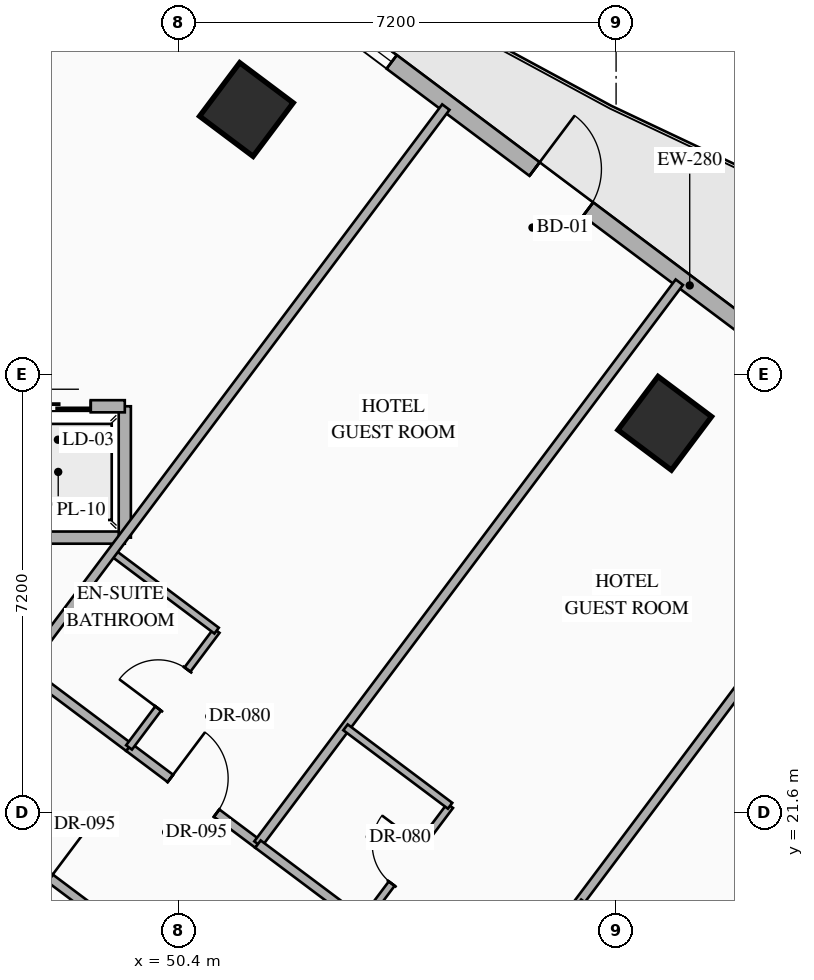
"""IFC4 building model, lengths in metres.
Left out: names, types, materials, properties, quantities, classifications, styles, units other than length and angle.
Written with IfcOpenShell. Run it as: python <this file> out.ifc"""

import sys

from ifc_helpers import new_model, si_unit, direction, frame, frame_2d, origin, origin_2d, place, context, subcontext, project, spatial, rectangle, hollow_rectangle, extrude, element, fill, save


model = new_model("IFC4")
c1 = context("Model", 3, precision=1e-05, world=origin(), true_north=direction((0.0, 1.0)))
c2 = subcontext(c1, "Body", "Model", "MODEL_VIEW")
j1 = project(units=[si_unit("LENGTHUNIT", "METRE"), si_unit("PLANEANGLEUNIT", "RADIAN")], contexts=[c1])
p1 = place(None, origin())
s1 = spatial("IfcSite", under=j1, at=p1, CompositionType="ELEMENT")
p2 = place(p1, origin())
s2 = spatial("IfcBuilding", under=s1, at=p2, CompositionType="ELEMENT")
p3 = place(p2, frame((0.0, 0.0, 50.0)))
s3 = spatial("IfcBuildingStorey", under=s2, at=p3, CompositionType="ELEMENT", Elevation=50.0)
for number, where, z_axis, x_axis in (
    (1, (51.52, 33.16, 0.0), (0.0, 0.0, 1.0), (0.8, -0.6, 0.0)),
    (2, (58.4, 28.0, 0.0), (0.0, 0.0, 1.0), (0.8, -0.6, 0.0)),
):
    element("IfcColumn", number, at=place(p3, frame(where, z_axis=z_axis, x_axis=x_axis)), inside=s3, PredefinedType="COLUMN", context=c2, shape_type="SweptSolid", body=[
        extrude(hollow_rectangle(XDim=1.1, YDim=1.1, WallThickness=0.04, at=origin_2d()), origin(), (0.0, 0.0, 1.0), 3.35),
    ])
p4 = place(p3, frame((44.86, 40.73, 0.0), z_axis=(0.0, 0.0, 1.0), x_axis=(0.800006902154, -0.599990797017, 0.0)))
e3 = element("IfcWall", 3, at=p4, inside=s3, PredefinedType="STANDARD", context=c2, shape_type="SweptSolid", body=[
    extrude(rectangle(XDim=29.712, YDim=0.28, at=frame_2d((14.856, 0.0))), origin(), (0.0, 0.0, 1.0), 3.13),
])
p5 = place(p4, frame((14.249, 0.0, 0.0)))
e4 = element("IfcOpeningElement", 4, at=p5, cuts=e3, PredefinedType="OPENING", context=c2, shape_type="SweptSolid", body=[
    extrude(rectangle(XDim=1.1, YDim=2.2, at=frame_2d((0.55, 1.1))), frame((0.0, 0.15, 0.0), z_axis=(0.0, -1.0, 0.0), x_axis=(1.0, 0.0, 0.0)), (0.0, 0.0, 1.0), 0.3),
])
p6 = place(p4, frame((1.612, 0.0, 0.85)))
e5 = element("IfcOpeningElement", 5, at=p6, cuts=e3, PredefinedType="OPENING", context=c2, shape_type="SweptSolid", body=[
    extrude(rectangle(XDim=1.4, YDim=1.8, at=frame_2d((0.7, 0.9))), frame((0.0, 0.15, 0.0), z_axis=(0.0, -1.0, 0.0), x_axis=(1.0, 0.0, 0.0)), (0.0, 0.0, 1.0), 0.3),
])
p7 = place(p4, frame((5.667, 0.0, 0.85)))
e6 = element("IfcOpeningElement", 6, at=p7, cuts=e3, PredefinedType="OPENING", context=c2, shape_type="SweptSolid", body=[
    extrude(rectangle(XDim=1.4, YDim=1.8, at=frame_2d((0.7, 0.9))), frame((0.0, 0.15, 0.0), z_axis=(0.0, -1.0, 0.0), x_axis=(1.0, 0.0, 0.0)), (0.0, 0.0, 1.0), 0.3),
])
p8 = place(p4, frame((9.912, 0.0, 0.85)))
e7 = element("IfcOpeningElement", 7, at=p8, cuts=e3, PredefinedType="OPENING", context=c2, shape_type="SweptSolid", body=[
    extrude(rectangle(XDim=1.4, YDim=1.8, at=frame_2d((0.7, 0.9))), frame((0.0, 0.15, 0.0), z_axis=(0.0, -1.0, 0.0), x_axis=(1.0, 0.0, 0.0)), (0.0, 0.0, 1.0), 0.3),
])
p9 = place(p4, frame((19.528, 0.0, 0.85)))
e8 = element("IfcOpeningElement", 8, at=p9, cuts=e3, PredefinedType="OPENING", context=c2, shape_type="SweptSolid", body=[
    extrude(rectangle(XDim=1.4, YDim=1.8, at=frame_2d((0.7, 0.9))), frame((0.0, 0.15, 0.0), z_axis=(0.0, -1.0, 0.0), x_axis=(1.0, 0.0, 0.0)), (0.0, 0.0, 1.0), 0.3),
])
p10 = place(p4, frame((23.451, 0.0, 0.85)))
e9 = element("IfcOpeningElement", 9, at=p10, cuts=e3, PredefinedType="OPENING", context=c2, shape_type="SweptSolid", body=[
    extrude(rectangle(XDim=1.4, YDim=1.8, at=frame_2d((0.7, 0.9))), frame((0.0, 0.15, 0.0), z_axis=(0.0, -1.0, 0.0), x_axis=(1.0, 0.0, 0.0)), (0.0, 0.0, 1.0), 0.3),
])
p11 = place(p4, frame((27.852, 0.0, 0.85)))
e10 = element("IfcOpeningElement", 10, at=p11, cuts=e3, PredefinedType="OPENING", context=c2, shape_type="SweptSolid", body=[
    extrude(rectangle(XDim=1.4, YDim=1.8, at=frame_2d((0.7, 0.9))), frame((0.0, 0.15, 0.0), z_axis=(0.0, -1.0, 0.0), x_axis=(1.0, 0.0, 0.0)), (0.0, 0.0, 1.0), 0.3),
])
p12 = place(p3, frame((53.318, 2.487, 0.0), z_axis=(0.0, 0.0, 1.0), x_axis=(-0.800004174678, 0.599994433723, 0.0)))
e11 = element("IfcWall", 11, at=p12, inside=s3, PredefinedType="STANDARD", context=c2, shape_type="SweptSolid", body=[
    extrude(rectangle(XDim=35.089, YDim=0.28, at=frame_2d((17.544, 0.0))), origin(), (0.0, 0.0, 1.0), 3.13),
])
p13 = place(p12, frame((1.931, 0.0, 0.85)))
e12 = element("IfcOpeningElement", 12, at=p13, cuts=e11, PredefinedType="OPENING", context=c2, shape_type="SweptSolid", body=[
    extrude(rectangle(XDim=1.4, YDim=1.8, at=frame_2d((0.7, 0.9))), frame((0.0, 0.15, 0.0), z_axis=(0.0, -1.0, 0.0), x_axis=(1.0, 0.0, 0.0)), (0.0, 0.0, 1.0), 0.3),
])
p14 = place(p12, frame((6.819, 0.0, 0.85)))
e13 = element("IfcOpeningElement", 13, at=p14, cuts=e11, PredefinedType="OPENING", context=c2, shape_type="SweptSolid", body=[
    extrude(rectangle(XDim=1.4, YDim=1.8, at=frame_2d((0.7, 0.9))), frame((0.0, 0.15, 0.0), z_axis=(0.0, -1.0, 0.0), x_axis=(1.0, 0.0, 0.0)), (0.0, 0.0, 1.0), 0.3),
])
p15 = place(p12, frame((11.832, 0.0, 0.85)))
e14 = element("IfcOpeningElement", 14, at=p15, cuts=e11, PredefinedType="OPENING", context=c2, shape_type="SweptSolid", body=[
    extrude(rectangle(XDim=1.4, YDim=1.8, at=frame_2d((0.7, 0.9))), frame((0.0, 0.15, 0.0), z_axis=(0.0, -1.0, 0.0), x_axis=(1.0, 0.0, 0.0)), (0.0, 0.0, 1.0), 0.3),
])
p16 = place(p12, frame((17.647, 0.0, 0.85)))
e15 = element("IfcOpeningElement", 15, at=p16, cuts=e11, PredefinedType="OPENING", context=c2, shape_type="SweptSolid", body=[
    extrude(rectangle(XDim=1.4, YDim=1.8, at=frame_2d((0.7, 0.9))), frame((0.0, 0.15, 0.0), z_axis=(0.0, -1.0, 0.0), x_axis=(1.0, 0.0, 0.0)), (0.0, 0.0, 1.0), 0.3),
])
p17 = place(p12, frame((21.857, 0.0, 0.85)))
e16 = element("IfcOpeningElement", 16, at=p17, cuts=e11, PredefinedType="OPENING", context=c2, shape_type="SweptSolid", body=[
    extrude(rectangle(XDim=1.4, YDim=1.8, at=frame_2d((0.7, 0.9))), frame((0.0, 0.15, 0.0), z_axis=(0.0, -1.0, 0.0), x_axis=(1.0, 0.0, 0.0)), (0.0, 0.0, 1.0), 0.3),
])
p18 = place(p12, frame((26.87, 0.0, 0.85)))
e17 = element("IfcOpeningElement", 17, at=p18, cuts=e11, PredefinedType="OPENING", context=c2, shape_type="SweptSolid", body=[
    extrude(rectangle(XDim=1.4, YDim=1.8, at=frame_2d((0.7, 0.9))), frame((0.0, 0.15, 0.0), z_axis=(0.0, -1.0, 0.0), x_axis=(1.0, 0.0, 0.0)), (0.0, 0.0, 1.0), 0.3),
])
p19 = place(p12, frame((31.757, 0.0, 0.85)))
e18 = element("IfcOpeningElement", 18, at=p19, cuts=e11, PredefinedType="OPENING", context=c2, shape_type="SweptSolid", body=[
    extrude(rectangle(XDim=1.4, YDim=1.8, at=frame_2d((0.7, 0.9))), frame((0.0, 0.15, 0.0), z_axis=(0.0, -1.0, 0.0), x_axis=(1.0, 0.0, 0.0)), (0.0, 0.0, 1.0), 0.3),
])
p20 = place(p3, frame((45.12, 26.12, 0.0), z_axis=(0.0, 0.0, 1.0), x_axis=(1.0, 0.0, 0.0)))
e19 = element("IfcWall", 19, at=p20, inside=s3, PredefinedType="STANDARD", context=c2, shape_type="SweptSolid", body=[
    extrude(rectangle(XDim=4.4, YDim=0.2, at=frame_2d((2.2, 0.0))), origin(), (0.0, 0.0, 1.0), 3.13),
])
p21 = place(p3, frame((49.52, 26.12, 0.0), z_axis=(0.0, 0.0, 1.0), x_axis=(0.0, 1.0, 0.0)))
e20 = element("IfcWall", 20, at=p21, inside=s3, PredefinedType="STANDARD", context=c2, shape_type="SweptSolid", body=[
    extrude(rectangle(XDim=2.16, YDim=0.2, at=frame_2d((1.08, 0.0))), origin(), (0.0, 0.0, 1.0), 3.13),
])
p22 = place(p3, frame((45.12, 28.28, 0.0), z_axis=(0.0, 0.0, 1.0), x_axis=(1.0, 0.0, 0.0)))
e21 = element("IfcWall", 21, at=p22, inside=s3, PredefinedType="STANDARD", context=c2, shape_type="SweptSolid", body=[
    extrude(rectangle(XDim=4.4, YDim=0.2, at=frame_2d((2.2, 0.0))), origin(), (0.0, 0.0, 1.0), 3.13),
])
p23 = place(p22, frame((0.56, 0.0, 0.0)))
e22 = element("IfcOpeningElement", 22, at=p23, cuts=e21, PredefinedType="OPENING", context=c2, shape_type="SweptSolid", body=[
    extrude(rectangle(XDim=1.08, YDim=2.15, at=frame_2d((0.54, 1.075))), frame((0.0, 0.11, 0.0), z_axis=(0.0, -1.0, 0.0), x_axis=(1.0, 0.0, 0.0)), (0.0, 0.0, 1.0), 0.22),
])
p24 = place(p22, frame((2.76, 0.0, 0.0)))
e23 = element("IfcOpeningElement", 23, at=p24, cuts=e21, PredefinedType="OPENING", context=c2, shape_type="SweptSolid", body=[
    extrude(rectangle(XDim=1.08, YDim=2.15, at=frame_2d((0.54, 1.075))), frame((0.0, 0.11, 0.0), z_axis=(0.0, -1.0, 0.0), x_axis=(1.0, 0.0, 0.0)), (0.0, 0.0, 1.0), 0.22),
])
p25 = place(p3, frame((47.87, 23.96, 0.0), z_axis=(0.0, 0.0, 1.0), x_axis=(0.79998637334, -0.60001816845, 0.0)))
e24 = element("IfcWall", 24, at=p25, inside=s3, PredefinedType="PARTITIONING", context=c2, shape_type="SweptSolid", body=[
    extrude(rectangle(XDim=2.15, YDim=0.15, at=frame_2d((1.075, 0.0))), origin(), (0.0, 0.0, 1.0), 2.775),
])
p26 = place(p3, frame((49.59, 22.67, 0.0), z_axis=(0.0, 0.0, 1.0), x_axis=(0.800011056104, -0.599985258246, 0.0)))
e25 = element("IfcWall", 25, at=p26, inside=s3, PredefinedType="PARTITIONING", context=c2, shape_type="SweptSolid", body=[
    extrude(rectangle(XDim=2.65, YDim=0.15, at=frame_2d((1.325, 0.0))), origin(), (0.0, 0.0, 1.0), 2.775),
])
p27 = place(p26, frame((0.85, 0.0, 0.0)))
e26 = element("IfcOpeningElement", 26, at=p27, cuts=e25, PredefinedType="OPENING", context=c2, shape_type="SweptSolid", body=[
    extrude(rectangle(XDim=0.95, YDim=2.15, at=frame_2d((0.475, 1.075))), frame((0.0, 0.085, 0.0), z_axis=(0.0, -1.0, 0.0), x_axis=(1.0, 0.0, 0.0)), (0.0, 0.0, 1.0), 0.17),
])
p28 = place(p3, frame((49.59, 22.67, 0.0), z_axis=(0.0, 0.0, 1.0), x_axis=(0.599951172744, 0.800036618114, 0.0)))
e27 = element("IfcWall", 27, at=p28, inside=s3, PredefinedType="PARTITIONING", context=c2, shape_type="SweptSolid", body=[
    extrude(rectangle(XDim=2.4, YDim=0.12, at=frame_2d((1.2, 0.0))), origin(), (0.0, 0.0, 1.0), 3.13),
])
p29 = place(p28, frame((0.8, 0.0, 0.0)))
e28 = element("IfcOpeningElement", 28, at=p29, cuts=e27, PredefinedType="OPENING", context=c2, shape_type="SweptSolid", body=[
    extrude(rectangle(XDim=0.8, YDim=2.06, at=frame_2d((0.4, 1.03))), frame((0.0, 0.07, 0.0), z_axis=(0.0, -1.0, 0.0), x_axis=(1.0, 0.0, 0.0)), (0.0, 0.0, 1.0), 0.14),
])
p30 = place(p3, frame((49.31, 25.88, 0.0), z_axis=(0.0, 0.0, 1.0), x_axis=(0.800040880289, -0.59994548908, 0.0)))
e29 = element("IfcWall", 29, at=p30, inside=s3, PredefinedType="PARTITIONING", context=c2, shape_type="SweptSolid", body=[
    extrude(rectangle(XDim=2.15, YDim=0.12, at=frame_2d((1.075, 0.0))), origin(), (0.0, 0.0, 1.0), 3.13),
])
for number, where, z_axis, x_axis in (
    (30, (47.87, 23.96, 0.0), (0.0, 0.0, 1.0), (0.6, 0.8, 0.0)),
    (31, (51.71, 21.08, 0.0), (0.0, 0.0, 1.0), (0.6, 0.8, 0.0)),
):
    element("IfcWall", number, at=place(p3, frame(where, z_axis=z_axis, x_axis=x_axis)), inside=s3, PredefinedType="PARTITIONING", context=c2, shape_type="SweptSolid", body=[
        extrude(rectangle(XDim=11.55, YDim=0.15, at=frame_2d((5.775, 0.0))), origin(), (0.0, 0.0, 1.0), 3.13),
    ])
p31 = place(p3, frame((51.71, 21.08, 0.0), z_axis=(0.0, 0.0, 1.0), x_axis=(0.79998637334, -0.60001816845, 0.0)))
e32 = element("IfcWall", 32, at=p31, inside=s3, PredefinedType="PARTITIONING", context=c2, shape_type="SweptSolid", body=[
    extrude(rectangle(XDim=2.15, YDim=0.15, at=frame_2d((1.075, 0.0))), origin(), (0.0, 0.0, 1.0), 2.775),
])
p32 = place(p3, frame((53.43, 19.79, 0.0), z_axis=(0.0, 0.0, 1.0), x_axis=(0.600065100855, 0.79995117022, 0.0)))
e33 = element("IfcWall", 33, at=p32, inside=s3, PredefinedType="PARTITIONING", context=c2, shape_type="SweptSolid", body=[
    extrude(rectangle(XDim=2.4, YDim=0.12, at=frame_2d((1.2, 0.0))), origin(), (0.0, 0.0, 1.0), 3.13),
])
p33 = place(p32, frame((0.8, 0.0, 0.0)))
e34 = element("IfcOpeningElement", 34, at=p33, cuts=e33, PredefinedType="OPENING", context=c2, shape_type="SweptSolid", body=[
    extrude(rectangle(XDim=0.8, YDim=2.06, at=frame_2d((0.4, 1.03))), frame((0.0, 0.07, 0.0), z_axis=(0.0, -1.0, 0.0), x_axis=(1.0, 0.0, 0.0)), (0.0, 0.0, 1.0), 0.14),
])
p34 = place(p3, frame((53.15, 23.0, 0.0), z_axis=(0.0, 0.0, 1.0), x_axis=(0.800027249606, -0.599963665473, 0.0)))
e35 = element("IfcWall", 35, at=p34, inside=s3, PredefinedType="PARTITIONING", context=c2, shape_type="SweptSolid", body=[
    extrude(rectangle(XDim=2.15, YDim=0.12, at=frame_2d((1.075, 0.0))), origin(), (0.0, 0.0, 1.0), 3.13),
])
p35 = place(p3, frame((55.55, 18.2, 0.0), z_axis=(0.0, 0.0, 1.0), x_axis=(0.599996617946, 0.80000253653, 0.0)))
e36 = element("IfcWall", 36, at=p35, inside=s3, PredefinedType="PARTITIONING", context=c2, shape_type="SweptSolid", body=[
    extrude(rectangle(XDim=11.55, YDim=0.15, at=frame_2d((5.775, 0.0))), origin(), (0.0, 0.0, 1.0), 3.13),
])
p36 = place(p3, frame((56.99, 20.12, 0.0), z_axis=(0.0, 0.0, 1.0), x_axis=(0.79998637334, -0.60001816845, 0.0)))
e37 = element("IfcWall", 37, at=p36, inside=s3, PredefinedType="PARTITIONING", context=c2, shape_type="SweptSolid", body=[
    extrude(rectangle(XDim=2.15, YDim=0.12, at=frame_2d((1.075, 0.0))), origin(), (0.0, 0.0, 1.0), 3.13),
])
p37 = place(p3, frame((59.55, 15.2, 0.0), z_axis=(0.0, 0.0, 1.0), x_axis=(0.599996617946, 0.80000253653, 0.0)))
e38 = element("IfcWall", 38, at=p37, inside=s3, PredefinedType="PARTITIONING", context=c2, shape_type="SweptSolid", body=[
    extrude(rectangle(XDim=11.55, YDim=0.15, at=frame_2d((5.775, 0.0))), origin(), (0.0, 0.0, 1.0), 3.13),
])
p38 = place(p3, frame((46.37, 21.96, 0.0), z_axis=(0.0, 0.0, 1.0), x_axis=(0.799977170108, -0.600030438649, 0.0)))
e39 = element("IfcWall", 39, at=p38, inside=s3, PredefinedType="PARTITIONING", context=c2, shape_type="SweptSolid", body=[
    extrude(rectangle(XDim=3.85, YDim=0.15, at=frame_2d((1.925, 0.0))), origin(), (0.0, 0.0, 1.0), 2.425),
])
p39 = place(p38, frame((1.45, 0.0, 0.0)))
e40 = element("IfcOpeningElement", 40, at=p39, cuts=e39, PredefinedType="OPENING", context=c2, shape_type="SweptSolid", body=[
    extrude(rectangle(XDim=0.95, YDim=2.15, at=frame_2d((0.475, 1.075))), frame((0.0, 0.085, 0.0), z_axis=(0.0, -1.0, 0.0), x_axis=(1.0, 0.0, 0.0)), (0.0, 0.0, 1.0), 0.17),
])
p40 = place(p5, origin())
e41 = element("IfcDoor", 41, at=p40, inside=s3, OperationType="SINGLE_SWING_LEFT", PredefinedType="DOOR", context=c2, shape_type="SweptSolid", body=[
    extrude(rectangle(XDim=1.1, YDim=2.2, at=frame_2d((0.55, 1.1))), frame((0.0, 0.025, 0.0), z_axis=(0.0, -1.0, 0.0), x_axis=(1.0, 0.0, 0.0)), (0.0, 0.0, 1.0), 0.05),
])
fill(e4, e41)
p41 = place(p8, origin())
e42 = element("IfcWindow", 42, at=p41, inside=s3, PartitioningType="SINGLE_PANEL", PredefinedType="WINDOW", context=c2, shape_type="SweptSolid", body=[
    extrude(rectangle(XDim=1.4, YDim=1.8, at=frame_2d((0.7, 0.9))), frame((0.0, 0.03, 0.0), z_axis=(0.0, -1.0, 0.0), x_axis=(1.0, 0.0, 0.0)), (0.0, 0.0, 1.0), 0.06),
])
fill(e7, e42)
p42 = place(p24, origin())
e43 = element("IfcDoor", 43, at=p42, inside=s3, OperationType="SLIDING_TO_LEFT", PredefinedType="USERDEFINED", context=c2, shape_type="SweptSolid", body=[
    extrude(rectangle(XDim=1.08, YDim=2.15, at=frame_2d((0.54, 1.075))), frame((0.0, 0.025, 0.0), z_axis=(0.0, -1.0, 0.0), x_axis=(1.0, 0.0, 0.0)), (0.0, 0.0, 1.0), 0.05),
])
fill(e23, e43)
p43 = place(p27, origin())
e44 = element("IfcDoor", 44, at=p43, inside=s3, OperationType="SINGLE_SWING_LEFT", PredefinedType="DOOR", context=c2, shape_type="SweptSolid", body=[
    extrude(rectangle(XDim=0.95, YDim=2.15, at=frame_2d((0.475, 1.075))), frame((0.0, 0.025, 0.0), z_axis=(0.0, -1.0, 0.0), x_axis=(1.0, 0.0, 0.0)), (0.0, 0.0, 1.0), 0.05),
])
fill(e26, e44)
p44 = place(p29, origin())
e45 = element("IfcDoor", 45, at=p44, inside=s3, OperationType="SINGLE_SWING_LEFT", PredefinedType="DOOR", context=c2, shape_type="SweptSolid", body=[
    extrude(rectangle(XDim=0.8, YDim=2.06, at=frame_2d((0.4, 1.03))), frame((0.0, 0.025, 0.0), z_axis=(0.0, -1.0, 0.0), x_axis=(1.0, 0.0, 0.0)), (0.0, 0.0, 1.0), 0.05),
])
fill(e28, e45)
p45 = place(p33, origin())
e46 = element("IfcDoor", 46, at=p45, inside=s3, OperationType="SINGLE_SWING_RIGHT", PredefinedType="DOOR", context=c2, shape_type="SweptSolid", body=[
    extrude(rectangle(XDim=0.8, YDim=2.06, at=frame_2d((0.4, 1.03))), frame((0.0, 0.025, 0.0), z_axis=(0.0, -1.0, 0.0), x_axis=(1.0, 0.0, 0.0)), (0.0, 0.0, 1.0), 0.05),
])
fill(e34, e46)
save(model, sys.argv[1])
